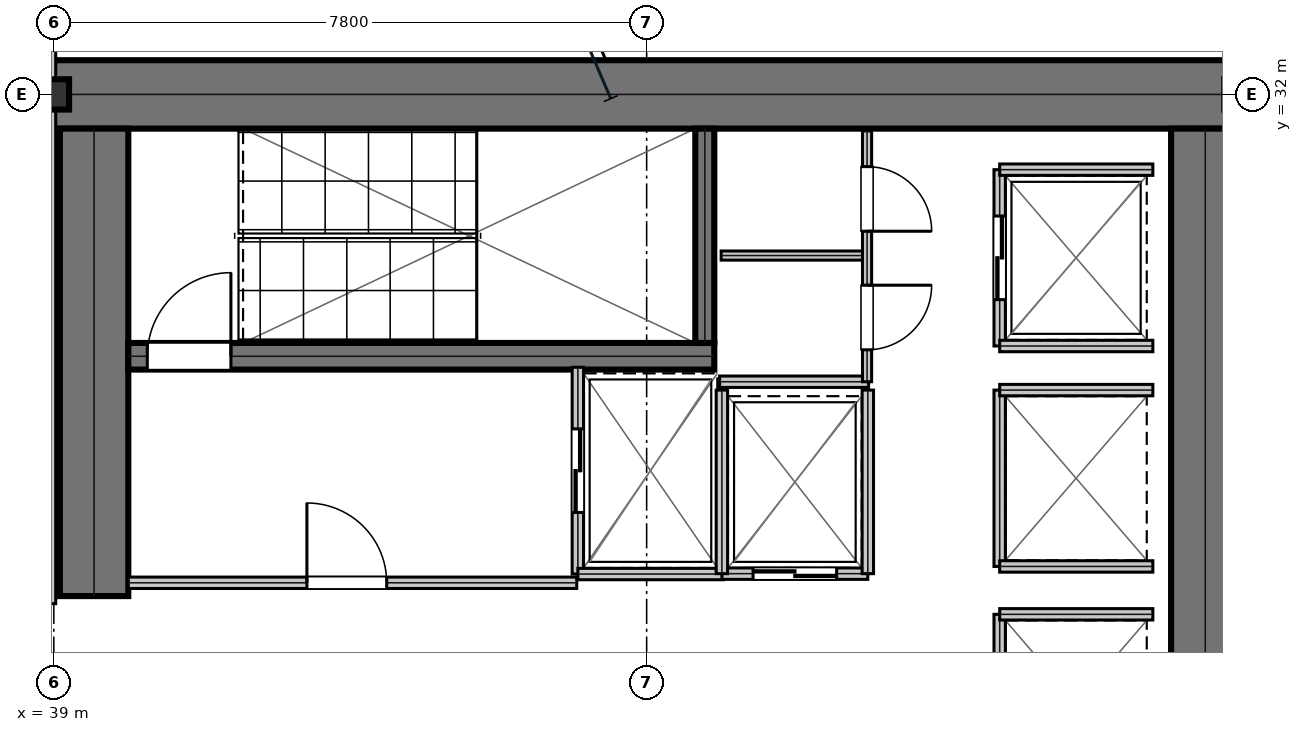
"""IFC4 building model, lengths in metres.
Left out: names, types, materials, properties, quantities, classifications, styles, units other than length and angle.
Written with IfcOpenShell. Run it as: python <this file> out.ifc"""

import sys

from ifc_helpers import new_model, si_unit, direction, frame, frame_2d, origin, origin_2d, place, context, subcontext, project, spatial, rectangle, i_section, extrude, element, fill, save


model = new_model("IFC4")
c1 = context("Model", 3, precision=1e-05, world=origin(), true_north=direction((0.0, 1.0)))
c2 = subcontext(c1, "Body", "Model", "MODEL_VIEW")
j1 = project(units=[si_unit("LENGTHUNIT", "METRE"), si_unit("PLANEANGLEUNIT", "RADIAN")], contexts=[c1])
p1 = place(None, origin())
s1 = spatial("IfcSite", under=j1, at=p1, CompositionType="ELEMENT")
p2 = place(p1, origin())
s2 = spatial("IfcBuilding", under=s1, at=p2, CompositionType="ELEMENT")
p3 = place(p2, frame((0.0, 0.0, 86.4)))
s3 = spatial("IfcBuildingStorey", under=s2, at=p3, CompositionType="ELEMENT", Elevation=86.4)
p4 = place(p3, frame((38.8, 32.0, 0.0), z_axis=(0.0, 0.0, 1.0), x_axis=(1.0, 0.0, 0.0)))
e1 = element("IfcWall", 1, at=p4, inside=s3, PredefinedType="SHEAR", context=c2, shape_type="SweptSolid", body=[
    extrude(rectangle(XDim=16.0, YDim=0.9, at=frame_2d((8.0, 0.0))), origin(), (0.0, 0.0, 1.0), 3.81),
])
p5 = place(p3, frame((39.53, 25.4, 0.0), z_axis=(0.0, 0.0, 1.0), x_axis=(0.0, 1.0, 0.0)))
e2 = element("IfcWall", 2, at=p5, inside=s3, PredefinedType="SHEAR", context=c2, shape_type="SweptSolid", body=[
    extrude(rectangle(XDim=6.15, YDim=0.9, at=frame_2d((3.075, 0.0))), origin(), (0.0, 0.0, 1.0), 3.81),
])
p6 = place(p3, frame((54.15, 16.45, 0.0), z_axis=(0.0, 0.0, 1.0), x_axis=(0.0, 1.0, 0.0)))
e3 = element("IfcWall", 3, at=p6, inside=s3, PredefinedType="SHEAR", context=c2, shape_type="SweptSolid", body=[
    extrude(rectangle(XDim=15.1, YDim=0.9, at=frame_2d((7.55, 0.0))), origin(), (0.0, 0.0, 1.0), 3.81),
])
p7 = place(p3, frame((39.98, 28.555, 0.0), z_axis=(0.0, 0.0, 1.0), x_axis=(1.0, 0.0, 0.0)))
e4 = element("IfcWall", 4, at=p7, inside=s3, PredefinedType="SHEAR", context=c2, shape_type="SweptSolid", body=[
    extrude(rectangle(XDim=7.71, YDim=0.35, at=frame_2d((3.855, 0.0))), origin(), (0.0, 0.0, 1.0), 3.81),
])
p8 = place(p7, frame((0.25, 0.0, 0.0)))
e5 = element("IfcOpeningElement", 5, at=p8, cuts=e4, PredefinedType="OPENING", context=c2, shape_type="SweptSolid", body=[
    extrude(rectangle(XDim=1.1, YDim=2.15, at=frame_2d((0.55, 1.075))), frame((0.0, 0.185, 0.0), z_axis=(0.0, -1.0, 0.0), x_axis=(1.0, 0.0, 0.0)), (0.0, 0.0, 1.0), 0.37),
])
p9 = place(p3, frame((47.565, 28.73, 0.0), z_axis=(0.0, 0.0, 1.0), x_axis=(0.0, 1.0, 0.0)))
e6 = element("IfcWall", 6, at=p9, inside=s3, PredefinedType="SHEAR", context=c2, shape_type="SweptSolid", body=[
    extrude(rectangle(XDim=2.82, YDim=0.25, at=frame_2d((1.41, 0.0))), origin(), (0.0, 0.0, 1.0), 3.81),
])
p10 = place(p3, frame((39.0, 32.0, 0.0), z_axis=(0.0, 0.0, 1.0), x_axis=(1.0, 0.0, 0.0)))
e7 = element("IfcColumn", 7, at=p10, inside=s3, PredefinedType="COLUMN", context=c2, shape_type="SweptSolid", body=[
    extrude(i_section(OverallWidth=0.401, OverallDepth=0.399, WebThickness=0.025, FlangeThickness=0.04, at=origin_2d()), origin(), (0.0, 0.0, 1.0), 4.044),
])
p11 = place(p3, frame((39.98, 25.575, 0.0), z_axis=(0.0, 0.0, 1.0), x_axis=(1.0, 0.0, 0.0)))
e8 = element("IfcWall", 8, at=p11, inside=s3, PredefinedType="PARTITIONING", context=c2, shape_type="SweptSolid", body=[
    extrude(rectangle(XDim=5.9, YDim=0.15, at=frame_2d((2.95, 0.0))), origin(), (0.0, 0.0, 1.0), 3.81),
])
p12 = place(p11, frame((2.35, 0.0, 0.0)))
e9 = element("IfcOpeningElement", 9, at=p12, cuts=e8, PredefinedType="OPENING", context=c2, shape_type="SweptSolid", body=[
    extrude(rectangle(XDim=1.05, YDim=2.15, at=frame_2d((0.525, 1.075))), frame((0.0, 0.085, 0.0), z_axis=(0.0, -1.0, 0.0), x_axis=(1.0, 0.0, 0.0)), (0.0, 0.0, 1.0), 0.17),
])
p13 = place(p3, frame((45.895, 25.69, 0.0), z_axis=(0.0, 0.0, 1.0), x_axis=(0.0, 1.0, 0.0)))
e10 = element("IfcWall", 10, at=p13, inside=s3, PredefinedType="PARTITIONING", context=c2, shape_type="SweptSolid", body=[
    extrude(rectangle(XDim=2.72, YDim=0.15, at=frame_2d((1.36, 0.0))), origin(), (0.0, 0.0, 1.0), 3.81),
])
p14 = place(p13, frame((0.81, 0.0, 0.0)))
e11 = element("IfcOpeningElement", 11, at=p14, cuts=e10, PredefinedType="OPENING", context=c2, shape_type="SweptSolid", body=[
    extrude(rectangle(XDim=1.1, YDim=2.15, at=frame_2d((0.55, 1.075))), frame((0.0, 0.085, 0.0), z_axis=(0.0, -1.0, 0.0), x_axis=(1.0, 0.0, 0.0)), (0.0, 0.0, 1.0), 0.17),
])
p15 = place(p3, frame((45.895, 25.69, 0.0), z_axis=(0.0, 0.0, 1.0), x_axis=(1.0, 0.0, 0.0)))
e12 = element("IfcWall", 12, at=p15, inside=s3, PredefinedType="PARTITIONING", context=c2, shape_type="SweptSolid", body=[
    extrude(rectangle(XDim=1.915, YDim=0.15, at=frame_2d((0.958, 0.0))), origin(), (0.0, 0.0, 1.0), 3.81),
])
p16 = place(p3, frame((47.79, 25.695, 0.0), z_axis=(0.0, 0.0, 1.0), x_axis=(1.0, 0.0, 0.0)))
e13 = element("IfcWall", 13, at=p16, inside=s3, PredefinedType="PARTITIONING", context=c2, shape_type="SweptSolid", body=[
    extrude(rectangle(XDim=1.92, YDim=0.15, at=frame_2d((0.96, 0.0))), origin(), (0.0, 0.0, 1.0), 3.81),
])
p17 = place(p16, frame((0.41, 0.0, 0.0)))
e14 = element("IfcOpeningElement", 14, at=p17, cuts=e13, PredefinedType="OPENING", context=c2, shape_type="SweptSolid", body=[
    extrude(rectangle(XDim=1.1, YDim=2.15, at=frame_2d((0.55, 1.075))), frame((0.0, 0.085, 0.0), z_axis=(0.0, -1.0, 0.0), x_axis=(1.0, 0.0, 0.0)), (0.0, 0.0, 1.0), 0.17),
])
for number, where, z_axis, x_axis in (
    (15, (47.79, 25.695, 0.0), (0.0, 0.0, 1.0), (0.0, 1.0, 0.0)),
    (16, (49.71, 25.695, 0.0), (0.0, 0.0, 1.0), (0.0, 1.0, 0.0)),
):
    element("IfcWall", number, at=place(p3, frame(where, z_axis=z_axis, x_axis=x_axis)), inside=s3, PredefinedType="PARTITIONING", context=c2, shape_type="SweptSolid", body=[
        extrude(rectangle(XDim=2.415, YDim=0.15, at=frame_2d((1.208, 0.0))), origin(), (0.0, 0.0, 1.0), 3.81),
    ])
p18 = place(p3, frame((51.445, 28.69, 0.0), z_axis=(0.0, 0.0, 1.0), x_axis=(0.0, 1.0, 0.0)))
e17 = element("IfcWall", 17, at=p18, inside=s3, PredefinedType="PARTITIONING", context=c2, shape_type="SweptSolid", body=[
    extrude(rectangle(XDim=2.32, YDim=0.15, at=frame_2d((1.16, 0.0))), origin(), (0.0, 0.0, 1.0), 3.81),
])
p19 = place(p18, frame((0.61, 0.0, 0.0)))
e18 = element("IfcOpeningElement", 18, at=p19, cuts=e17, PredefinedType="OPENING", context=c2, shape_type="SweptSolid", body=[
    extrude(rectangle(XDim=1.1, YDim=2.15, at=frame_2d((0.55, 1.075))), frame((0.0, 0.085, 0.0), z_axis=(0.0, -1.0, 0.0), x_axis=(1.0, 0.0, 0.0)), (0.0, 0.0, 1.0), 0.17),
])
for number, where, z_axis, x_axis in (
    (19, (51.445, 28.69, 0.0), (0.0, 0.0, 1.0), (1.0, 0.0, 0.0)),
    (20, (51.445, 31.01, 0.0), (0.0, 0.0, 1.0), (1.0, 0.0, 0.0)),
):
    element("IfcWall", number, at=place(p3, frame(where, z_axis=z_axis, x_axis=x_axis)), inside=s3, PredefinedType="PARTITIONING", context=c2, shape_type="SweptSolid", body=[
        extrude(rectangle(XDim=2.015, YDim=0.15, at=frame_2d((1.007, 0.0))), origin(), (0.0, 0.0, 1.0), 3.81),
    ])
p20 = place(p3, frame((51.445, 25.79, 0.0), z_axis=(0.0, 0.0, 1.0), x_axis=(0.0, 1.0, 0.0)))
e21 = element("IfcWall", 21, at=p20, inside=s3, PredefinedType="PARTITIONING", context=c2, shape_type="SweptSolid", body=[
    extrude(rectangle(XDim=2.32, YDim=0.15, at=frame_2d((1.16, 0.0))), origin(), (0.0, 0.0, 1.0), 3.81),
])
for number, where, z_axis, x_axis in (
    (22, (51.445, 25.79, 0.0), (0.0, 0.0, 1.0), (1.0, 0.0, 0.0)),
    (23, (51.445, 28.11, 0.0), (0.0, 0.0, 1.0), (1.0, 0.0, 0.0)),
):
    element("IfcWall", number, at=place(p3, frame(where, z_axis=z_axis, x_axis=x_axis)), inside=s3, PredefinedType="PARTITIONING", context=c2, shape_type="SweptSolid", body=[
        extrude(rectangle(XDim=2.015, YDim=0.15, at=frame_2d((1.007, 0.0))), origin(), (0.0, 0.0, 1.0), 3.81),
    ])
p21 = place(p3, frame((51.445, 22.84, 0.0), z_axis=(0.0, 0.0, 1.0), x_axis=(0.0, 1.0, 0.0)))
e24 = element("IfcWall", 24, at=p21, inside=s3, PredefinedType="PARTITIONING", context=c2, shape_type="SweptSolid", body=[
    extrude(rectangle(XDim=2.32, YDim=0.15, at=frame_2d((1.16, 0.0))), origin(), (0.0, 0.0, 1.0), 3.81),
])
p22 = place(p3, frame((51.445, 25.16, 0.0), z_axis=(0.0, 0.0, 1.0), x_axis=(1.0, 0.0, 0.0)))
e25 = element("IfcWall", 25, at=p22, inside=s3, PredefinedType="PARTITIONING", context=c2, shape_type="SweptSolid", body=[
    extrude(rectangle(XDim=2.015, YDim=0.15, at=frame_2d((1.007, 0.0))), origin(), (0.0, 0.0, 1.0), 3.81),
])
p23 = place(p3, frame((47.76, 28.22, 0.0), z_axis=(0.0, 0.0, 1.0), x_axis=(1.0, 0.0, 0.0)))
e26 = element("IfcWall", 26, at=p23, inside=s3, PredefinedType="PARTITIONING", context=c2, shape_type="SweptSolid", body=[
    extrude(rectangle(XDim=1.96, YDim=0.15, at=frame_2d((0.98, 0.0))), origin(), (0.0, 0.0, 1.0), 3.81),
])
p24 = place(p3, frame((47.78, 29.88, 0.0), z_axis=(0.0, 0.0, 1.0), x_axis=(1.0, 0.0, 0.0)))
e27 = element("IfcWall", 27, at=p24, inside=s3, PredefinedType="PARTITIONING", context=c2, shape_type="SweptSolid", body=[
    extrude(rectangle(XDim=1.92, YDim=0.12, at=frame_2d((0.96, 0.0))), origin(), (0.0, 0.0, 1.0), 3.81),
])
p25 = place(p3, frame((49.7, 28.22, 0.0), z_axis=(0.0, 0.0, 1.0), x_axis=(0.0, 1.0, 0.0)))
e28 = element("IfcWall", 28, at=p25, inside=s3, PredefinedType="PARTITIONING", context=c2, shape_type="SweptSolid", body=[
    extrude(rectangle(XDim=3.3, YDim=0.12, at=frame_2d((1.65, 0.0))), origin(), (0.0, 0.0, 1.0), 3.81),
])
p26 = place(p25, frame((0.42, 0.0, 0.0)))
e29 = element("IfcOpeningElement", 29, at=p26, cuts=e28, PredefinedType="OPENING", context=c2, shape_type="SweptSolid", body=[
    extrude(rectangle(XDim=0.85, YDim=2.15, at=frame_2d((0.425, 1.075))), frame((0.0, 0.07, 0.0), z_axis=(0.0, -1.0, 0.0), x_axis=(1.0, 0.0, 0.0)), (0.0, 0.0, 1.0), 0.14),
])
p27 = place(p25, frame((1.98, 0.0, 0.0)))
e30 = element("IfcOpeningElement", 30, at=p27, cuts=e28, PredefinedType="OPENING", context=c2, shape_type="SweptSolid", body=[
    extrude(rectangle(XDim=0.85, YDim=2.15, at=frame_2d((0.425, 1.075))), frame((0.0, 0.07, 0.0), z_axis=(0.0, -1.0, 0.0), x_axis=(1.0, 0.0, 0.0)), (0.0, 0.0, 1.0), 0.14),
])
p28 = place(p3, frame((38.95, 25.3, 0.0), z_axis=(0.0, 0.0, 1.0), x_axis=(0.0, 1.0, 0.0)))
e31 = element("IfcWall", 31, at=p28, inside=s3, PredefinedType="PARTITIONING", context=c2, shape_type="SweptSolid", body=[
    extrude(rectangle(XDim=8.2, YDim=0.15, at=frame_2d((4.1, 0.0))), origin(), (0.0, 0.0, 1.0), 3.181),
])
p29 = place(p12, origin())
e32 = element("IfcDoor", 32, at=p29, inside=s3, OperationType="SINGLE_SWING_LEFT", PredefinedType="DOOR", context=c2, shape_type="SweptSolid", body=[
    extrude(rectangle(XDim=1.05, YDim=2.15, at=frame_2d((0.525, 1.075))), frame((0.0, 0.025, 0.0), z_axis=(0.0, -1.0, 0.0), x_axis=(1.0, 0.0, 0.0)), (0.0, 0.0, 1.0), 0.05),
])
fill(e9, e32)
p30 = place(p14, frame((1.1, 0.0, 0.0), z_axis=(0.0, 0.0, 1.0), x_axis=(-1.0, 0.0, 0.0)))
e33 = element("IfcDoor", 33, at=p30, inside=s3, OperationType="DOUBLE_DOOR_SLIDING", PredefinedType="DOOR", context=c2, shape_type="SweptSolid", body=[
    extrude(rectangle(XDim=1.1, YDim=2.15, at=frame_2d((0.55, 1.075))), frame((0.0, 0.025, 0.0), z_axis=(0.0, -1.0, 0.0), x_axis=(1.0, 0.0, 0.0)), (0.0, 0.0, 1.0), 0.05),
])
fill(e11, e33)
p31 = place(p17, frame((1.1, 0.0, 0.0), z_axis=(0.0, 0.0, 1.0), x_axis=(-1.0, 0.0, 0.0)))
e34 = element("IfcDoor", 34, at=p31, inside=s3, OperationType="DOUBLE_DOOR_SLIDING", PredefinedType="DOOR", context=c2, shape_type="SweptSolid", body=[
    extrude(rectangle(XDim=1.1, YDim=2.15, at=frame_2d((0.55, 1.075))), frame((0.0, 0.025, 0.0), z_axis=(0.0, -1.0, 0.0), x_axis=(1.0, 0.0, 0.0)), (0.0, 0.0, 1.0), 0.05),
])
fill(e14, e34)
p32 = place(p19, frame((1.1, 0.0, 0.0), z_axis=(0.0, 0.0, 1.0), x_axis=(-1.0, 0.0, 0.0)))
e35 = element("IfcDoor", 35, at=p32, inside=s3, OperationType="DOUBLE_DOOR_SLIDING", PredefinedType="DOOR", context=c2, shape_type="SweptSolid", body=[
    extrude(rectangle(XDim=1.1, YDim=2.15, at=frame_2d((0.55, 1.075))), frame((0.0, 0.025, 0.0), z_axis=(0.0, -1.0, 0.0), x_axis=(1.0, 0.0, 0.0)), (0.0, 0.0, 1.0), 0.05),
])
fill(e18, e35)
p33 = place(p26, frame((0.85, 0.0, 0.0), z_axis=(0.0, 0.0, 1.0), x_axis=(-1.0, 0.0, 0.0)))
e36 = element("IfcDoor", 36, at=p33, inside=s3, OperationType="SINGLE_SWING_LEFT", PredefinedType="DOOR", context=c2, shape_type="SweptSolid", body=[
    extrude(rectangle(XDim=0.85, YDim=2.15, at=frame_2d((0.425, 1.075))), frame((0.0, 0.025, 0.0), z_axis=(0.0, -1.0, 0.0), x_axis=(1.0, 0.0, 0.0)), (0.0, 0.0, 1.0), 0.05),
])
fill(e29, e36)
p34 = place(p27, frame((0.85, 0.0, 0.0), z_axis=(0.0, 0.0, 1.0), x_axis=(-1.0, 0.0, 0.0)))
e37 = element("IfcDoor", 37, at=p34, inside=s3, OperationType="SINGLE_SWING_RIGHT", PredefinedType="DOOR", context=c2, shape_type="SweptSolid", body=[
    extrude(rectangle(XDim=0.85, YDim=2.15, at=frame_2d((0.425, 1.075))), frame((0.0, 0.025, 0.0), z_axis=(0.0, -1.0, 0.0), x_axis=(1.0, 0.0, 0.0)), (0.0, 0.0, 1.0), 0.05),
])
fill(e30, e37)
p35 = place(p8, origin())
e38 = element("IfcDoor", 38, at=p35, inside=s3, OperationType="SINGLE_SWING_RIGHT", PredefinedType="DOOR", context=c2, shape_type="SweptSolid", body=[
    extrude(rectangle(XDim=1.1, YDim=2.15, at=frame_2d((0.55, 1.075))), frame((0.0, 0.025, 0.0), z_axis=(0.0, -1.0, 0.0), x_axis=(1.0, 0.0, 0.0)), (0.0, 0.0, 1.0), 0.05),
])
fill(e5, e38)
save(model, sys.argv[1])
